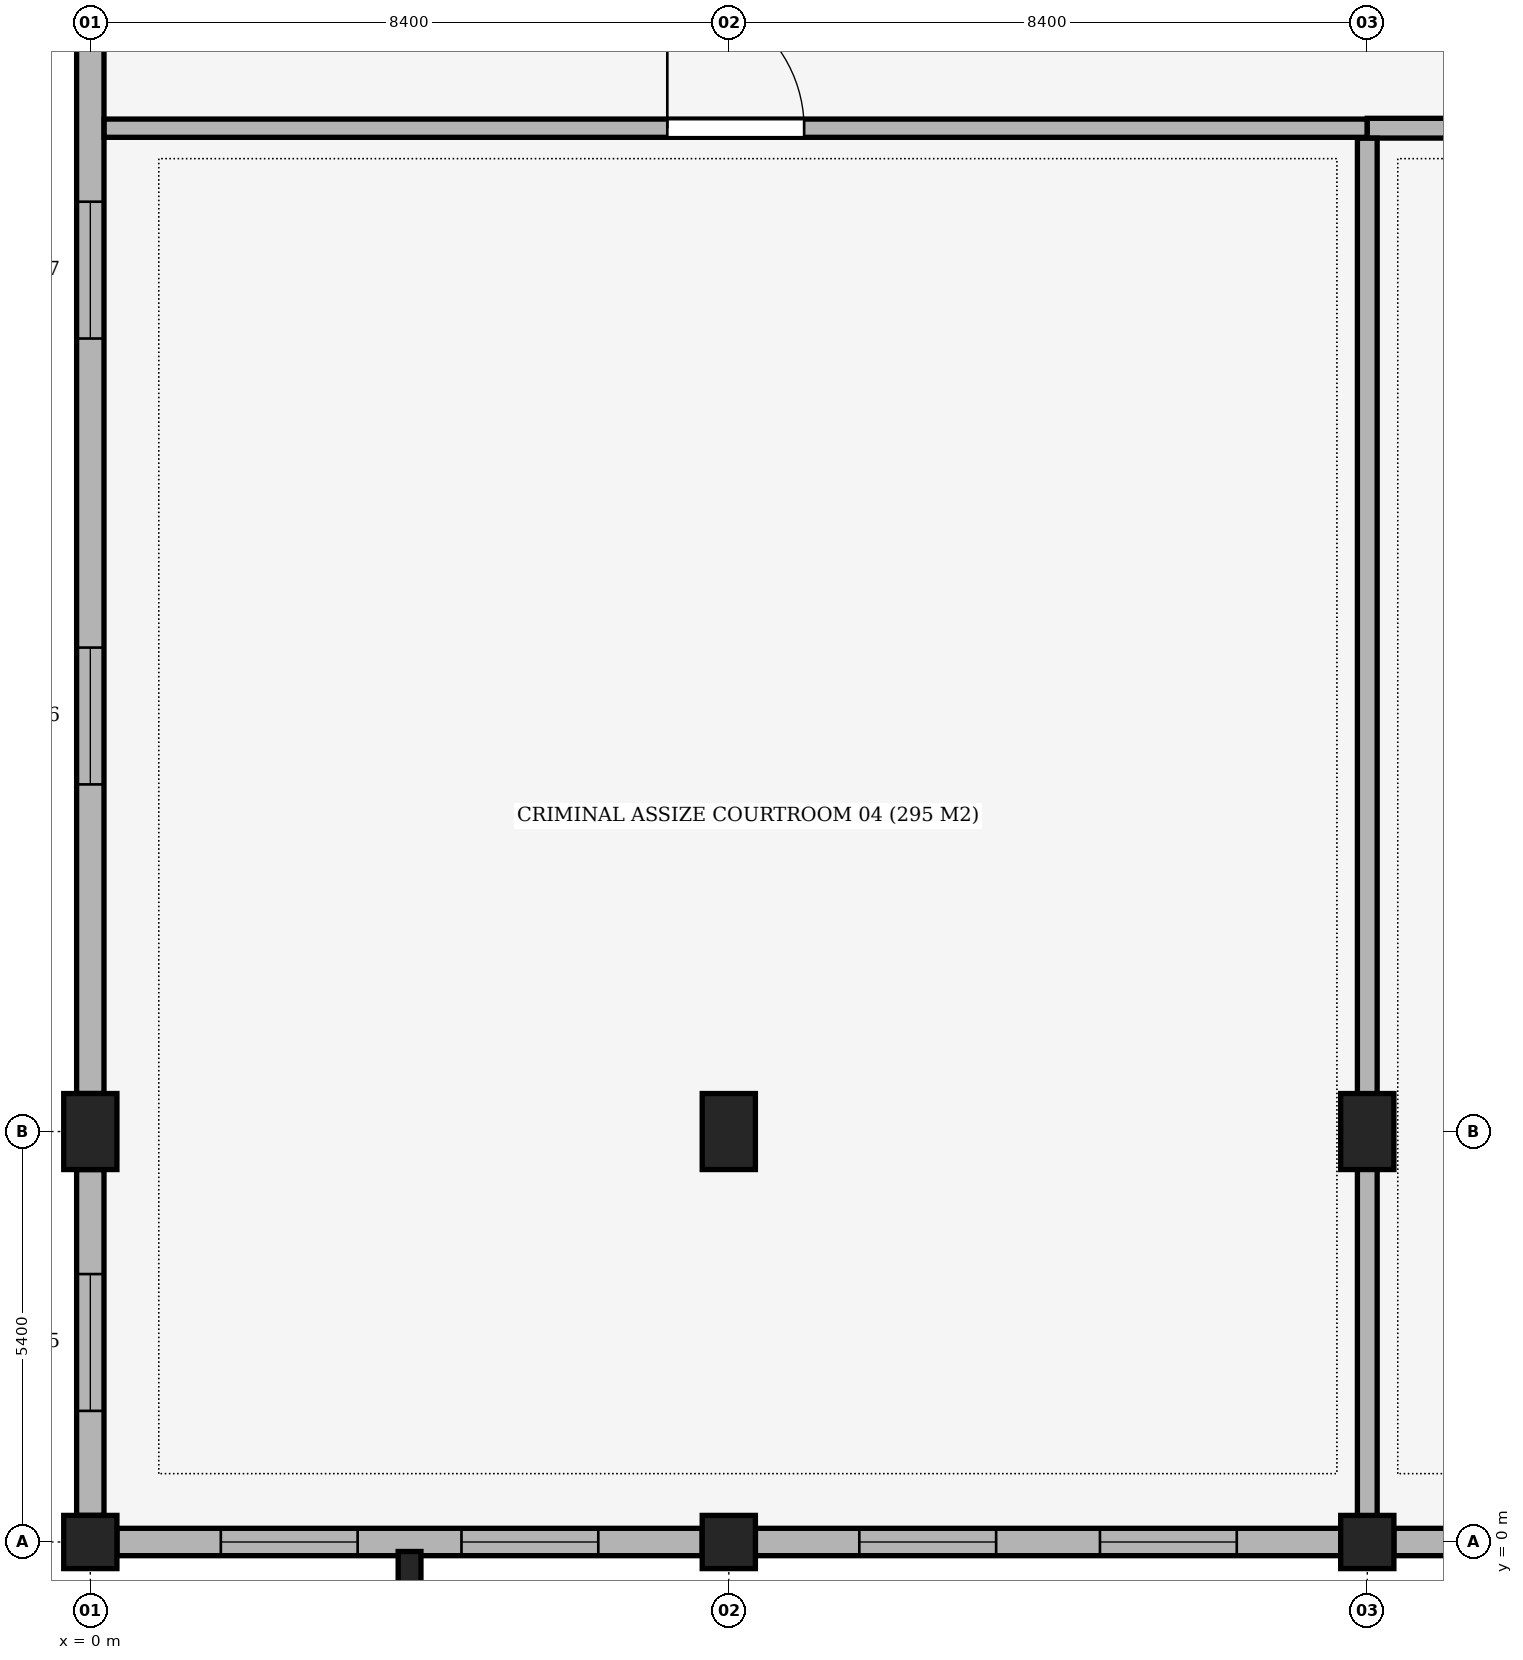
"""IFC4 building model, lengths in metres.
Left out: names, types, materials, properties, quantities, classifications, styles, units other than length and angle.
Written with IfcOpenShell. Run it as: python <this file> out.ifc"""

import sys

from ifc_helpers import new_model, si_unit, direction, frame, frame_2d, origin, origin_with_axes, origin_2d, place, context, subcontext, project, spatial, rectangle, extrude, element, fill, save


model = new_model("IFC4")
c1 = context("Model", 3, precision=1e-05, world=origin(), true_north=direction((0.0, 1.0)))
c2 = subcontext(c1, "Body", "Model", "MODEL_VIEW")
j1 = project(units=[si_unit("LENGTHUNIT", "METRE"), si_unit("PLANEANGLEUNIT", "RADIAN")], contexts=[c1])
p1 = place(None, origin())
s1 = spatial("IfcSite", under=j1, at=p1, CompositionType="ELEMENT")
p2 = place(p1, origin())
s2 = spatial("IfcBuilding", under=s1, at=p2, CompositionType="ELEMENT")
p3 = place(p2, frame((0.0, 0.0, 5.1)))
s3 = spatial("IfcBuildingStorey", under=s2, at=p3, CompositionType="ELEMENT", Elevation=5.1)
p4 = place(p3, origin_with_axes())
e1 = element("IfcColumn", 1, at=p4, inside=s3, PredefinedType="COLUMN", context=c2, shape_type="SweptSolid", body=[
    extrude(rectangle(XDim=0.7, YDim=0.7, at=origin_2d()), origin(), (0.0, 0.0, 1.0), 5.1),
])
p5 = place(p3, frame((0.0, 5.4, 0.0), z_axis=(0.0, 0.0, 1.0), x_axis=(1.0, 0.0, 0.0)))
e2 = element("IfcColumn", 2, at=p5, inside=s3, PredefinedType="COLUMN", context=c2, shape_type="SweptSolid", body=[
    extrude(rectangle(XDim=0.7, YDim=1.0, at=origin_2d()), origin(), (0.0, 0.0, 1.0), 5.1),
])
p6 = place(p3, frame((8.4, 0.0, 0.0), z_axis=(0.0, 0.0, 1.0), x_axis=(1.0, 0.0, 0.0)))
e3 = element("IfcColumn", 3, at=p6, inside=s3, PredefinedType="COLUMN", context=c2, shape_type="SweptSolid", body=[
    extrude(rectangle(XDim=0.7, YDim=0.7, at=origin_2d()), origin(), (0.0, 0.0, 1.0), 5.1),
])
p7 = place(p3, frame((8.4, 5.4, 0.0), z_axis=(0.0, 0.0, 1.0), x_axis=(1.0, 0.0, 0.0)))
e4 = element("IfcColumn", 4, at=p7, inside=s3, PredefinedType="COLUMN", context=c2, shape_type="SweptSolid", body=[
    extrude(rectangle(XDim=0.7, YDim=1.0, at=origin_2d()), origin(), (0.0, 0.0, 1.0), 5.1),
])
p8 = place(p3, frame((16.8, 0.0, 0.0), z_axis=(0.0, 0.0, 1.0), x_axis=(1.0, 0.0, 0.0)))
e5 = element("IfcColumn", 5, at=p8, inside=s3, PredefinedType="COLUMN", context=c2, shape_type="SweptSolid", body=[
    extrude(rectangle(XDim=0.7, YDim=0.7, at=origin_2d()), origin(), (0.0, 0.0, 1.0), 5.1),
])
p9 = place(p3, frame((16.8, 5.4, 0.0), z_axis=(0.0, 0.0, 1.0), x_axis=(1.0, 0.0, 0.0)))
e6 = element("IfcColumn", 6, at=p9, inside=s3, PredefinedType="COLUMN", context=c2, shape_type="SweptSolid", body=[
    extrude(rectangle(XDim=0.7, YDim=1.0, at=origin_2d()), origin(), (0.0, 0.0, 1.0), 5.1),
])
p10 = place(p3, frame((4.2, -0.35, 0.0), z_axis=(0.0, 0.0, 1.0), x_axis=(1.0, 0.0, 0.0)))
e7 = element("IfcColumn", 7, at=p10, inside=s3, PredefinedType="PILASTER", context=c2, shape_type="SweptSolid", body=[
    extrude(rectangle(XDim=0.3, YDim=0.45, at=origin_2d()), origin(), (0.0, 0.0, 1.0), 5.1),
])
p11 = place(p3, frame((24.85, 0.0, 0.0), z_axis=(0.0, 0.0, 1.0), x_axis=(-1.0, 0.0, 0.0)))
e8 = element("IfcWall", 8, at=p11, inside=s3, PredefinedType="SOLIDWALL", context=c2, shape_type="SweptSolid", body=[
    extrude(rectangle(XDim=7.7, YDim=0.36, at=frame_2d((3.85, 0.0))), origin(), (0.0, 0.0, 1.0), 4.07),
])
p12 = place(p11, frame((1.367, 0.0, 0.85)))
e9 = element("IfcOpeningElement", 9, at=p12, cuts=e8, PredefinedType="OPENING", context=c2, shape_type="SweptSolid", body=[
    extrude(rectangle(XDim=1.8, YDim=2.4, at=frame_2d((0.9, 1.2))), frame((0.0, 0.195, 0.0), z_axis=(0.0, -1.0, 0.0), x_axis=(1.0, 0.0, 0.0)), (0.0, 0.0, 1.0), 0.39),
])
p13 = place(p11, frame((4.533, 0.0, 0.85)))
e10 = element("IfcOpeningElement", 10, at=p13, cuts=e8, PredefinedType="OPENING", context=c2, shape_type="SweptSolid", body=[
    extrude(rectangle(XDim=1.8, YDim=2.4, at=frame_2d((0.9, 1.2))), frame((0.0, 0.195, 0.0), z_axis=(0.0, -1.0, 0.0), x_axis=(1.0, 0.0, 0.0)), (0.0, 0.0, 1.0), 0.39),
])
p14 = place(p3, frame((16.45, 0.0, 0.0), z_axis=(0.0, 0.0, 1.0), x_axis=(-1.0, 0.0, 0.0)))
e11 = element("IfcWall", 11, at=p14, inside=s3, PredefinedType="SOLIDWALL", context=c2, shape_type="SweptSolid", body=[
    extrude(rectangle(XDim=7.7, YDim=0.36, at=frame_2d((3.85, 0.0))), origin(), (0.0, 0.0, 1.0), 4.07),
])
p15 = place(p14, frame((1.367, 0.0, 0.85)))
e12 = element("IfcOpeningElement", 12, at=p15, cuts=e11, PredefinedType="OPENING", context=c2, shape_type="SweptSolid", body=[
    extrude(rectangle(XDim=1.8, YDim=2.4, at=frame_2d((0.9, 1.2))), frame((0.0, 0.195, 0.0), z_axis=(0.0, -1.0, 0.0), x_axis=(1.0, 0.0, 0.0)), (0.0, 0.0, 1.0), 0.39),
])
p16 = place(p14, frame((4.533, 0.0, 0.85)))
e13 = element("IfcOpeningElement", 13, at=p16, cuts=e11, PredefinedType="OPENING", context=c2, shape_type="SweptSolid", body=[
    extrude(rectangle(XDim=1.8, YDim=2.4, at=frame_2d((0.9, 1.2))), frame((0.0, 0.195, 0.0), z_axis=(0.0, -1.0, 0.0), x_axis=(1.0, 0.0, 0.0)), (0.0, 0.0, 1.0), 0.39),
])
p17 = place(p3, frame((8.05, 0.0, 0.0), z_axis=(0.0, 0.0, 1.0), x_axis=(-1.0, 0.0, 0.0)))
e14 = element("IfcWall", 14, at=p17, inside=s3, PredefinedType="SOLIDWALL", context=c2, shape_type="SweptSolid", body=[
    extrude(rectangle(XDim=7.7, YDim=0.36, at=frame_2d((3.85, 0.0))), origin(), (0.0, 0.0, 1.0), 4.07),
])
p18 = place(p17, frame((1.367, 0.0, 0.85)))
e15 = element("IfcOpeningElement", 15, at=p18, cuts=e14, PredefinedType="OPENING", context=c2, shape_type="SweptSolid", body=[
    extrude(rectangle(XDim=1.8, YDim=2.4, at=frame_2d((0.9, 1.2))), frame((0.0, 0.195, 0.0), z_axis=(0.0, -1.0, 0.0), x_axis=(1.0, 0.0, 0.0)), (0.0, 0.0, 1.0), 0.39),
])
p19 = place(p17, frame((4.533, 0.0, 0.85)))
e16 = element("IfcOpeningElement", 16, at=p19, cuts=e14, PredefinedType="OPENING", context=c2, shape_type="SweptSolid", body=[
    extrude(rectangle(XDim=1.8, YDim=2.4, at=frame_2d((0.9, 1.2))), frame((0.0, 0.195, 0.0), z_axis=(0.0, -1.0, 0.0), x_axis=(1.0, 0.0, 0.0)), (0.0, 0.0, 1.0), 0.39),
])
p20 = place(p3, frame((0.0, 0.35, 0.0), z_axis=(0.0, 0.0, 1.0), x_axis=(0.0, 1.0, 0.0)))
e17 = element("IfcWall", 17, at=p20, inside=s3, PredefinedType="SOLIDWALL", context=c2, shape_type="SweptSolid", body=[
    extrude(rectangle(XDim=4.55, YDim=0.36, at=frame_2d((2.275, 0.0))), origin(), (0.0, 0.0, 1.0), 4.27),
])
p21 = place(p20, frame((1.375, 0.0, 0.85)))
e18 = element("IfcOpeningElement", 18, at=p21, cuts=e17, PredefinedType="OPENING", context=c2, shape_type="SweptSolid", body=[
    extrude(rectangle(XDim=1.8, YDim=2.4, at=frame_2d((0.9, 1.2))), frame((0.0, 0.195, 0.0), z_axis=(0.0, -1.0, 0.0), x_axis=(1.0, 0.0, 0.0)), (0.0, 0.0, 1.0), 0.39),
])
p22 = place(p3, frame((0.0, 5.9, 0.0), z_axis=(0.0, 0.0, 1.0), x_axis=(0.0, 1.0, 0.0)))
e19 = element("IfcWall", 19, at=p22, inside=s3, PredefinedType="SOLIDWALL", context=c2, shape_type="SweptSolid", body=[
    extrude(rectangle(XDim=15.8, YDim=0.36, at=frame_2d((7.9, 0.0))), origin(), (0.0, 0.0, 1.0), 3.67),
])
p23 = place(p22, frame((4.067, 0.0, 0.85)))
e20 = element("IfcOpeningElement", 20, at=p23, cuts=e19, PredefinedType="OPENING", context=c2, shape_type="SweptSolid", body=[
    extrude(rectangle(XDim=1.8, YDim=2.4, at=frame_2d((0.9, 1.2))), frame((0.0, 0.195, 0.0), z_axis=(0.0, -1.0, 0.0), x_axis=(1.0, 0.0, 0.0)), (0.0, 0.0, 1.0), 0.39),
])
p24 = place(p22, frame((9.933, 0.0, 0.85)))
e21 = element("IfcOpeningElement", 21, at=p24, cuts=e19, PredefinedType="OPENING", context=c2, shape_type="SweptSolid", body=[
    extrude(rectangle(XDim=1.8, YDim=2.4, at=frame_2d((0.9, 1.2))), frame((0.0, 0.195, 0.0), z_axis=(0.0, -1.0, 0.0), x_axis=(1.0, 0.0, 0.0)), (0.0, 0.0, 1.0), 0.39),
])
p25 = place(p3, frame((0.182, 18.6, 0.0), z_axis=(0.0, 0.0, 1.0), x_axis=(1.0, 0.0, 0.0)))
e22 = element("IfcWall", 22, at=p25, inside=s3, PredefinedType="PARTITIONING", context=c2, shape_type="SweptSolid", body=[
    extrude(rectangle(XDim=16.618, YDim=0.24, at=frame_2d((8.309, 0.0))), origin(), (0.0, 0.0, 1.0), 3.67),
])
p26 = place(p25, frame((7.409, 0.0, 0.0)))
e23 = element("IfcOpeningElement", 23, at=p26, cuts=e22, PredefinedType="OPENING", context=c2, shape_type="SweptSolid", body=[
    extrude(rectangle(XDim=1.8, YDim=2.4, at=frame_2d((0.9, 1.2))), frame((0.0, 0.135, 0.0), z_axis=(0.0, -1.0, 0.0), x_axis=(1.0, 0.0, 0.0)), (0.0, 0.0, 1.0), 0.27),
])
p27 = place(p3, frame((16.8, 18.6, 0.0), z_axis=(0.0, 0.0, 1.0), x_axis=(1.0, 0.0, 0.0)))
e24 = element("IfcWall", 24, at=p27, inside=s3, PredefinedType="PARTITIONING", context=c2, shape_type="SweptSolid", body=[
    extrude(rectangle(XDim=16.3, YDim=0.26, at=frame_2d((8.15, 0.0))), origin(), (0.0, 0.0, 1.0), 3.67),
])
p28 = place(p27, frame((7.25, 0.0, 0.0)))
e25 = element("IfcOpeningElement", 25, at=p28, cuts=e24, PredefinedType="OPENING", context=c2, shape_type="SweptSolid", body=[
    extrude(rectangle(XDim=1.8, YDim=2.4, at=frame_2d((0.9, 1.2))), frame((0.0, 0.145, 0.0), z_axis=(0.0, -1.0, 0.0), x_axis=(1.0, 0.0, 0.0)), (0.0, 0.0, 1.0), 0.29),
])
p29 = place(p3, frame((16.8, 0.065, 0.0), z_axis=(0.0, 0.0, 1.0), x_axis=(0.0, 1.0, 0.0)))
e26 = element("IfcWall", 26, at=p29, inside=s3, PredefinedType="PARTITIONING", context=c2, shape_type="SweptSolid", body=[
    extrude(rectangle(XDim=18.403, YDim=0.26, at=frame_2d((9.202, 0.0))), origin(), (0.0, 0.0, 1.0), 3.67),
])
p30 = place(p15, origin())
e27 = element("IfcWindow", 27, at=p30, inside=s3, PartitioningType="SINGLE_PANEL", PredefinedType="WINDOW", context=c2, shape_type="SweptSolid", body=[
    extrude(rectangle(XDim=1.8, YDim=2.4, at=frame_2d((0.9, 1.2))), frame((0.0, 0.03, 0.0), z_axis=(0.0, -1.0, 0.0), x_axis=(1.0, 0.0, 0.0)), (0.0, 0.0, 1.0), 0.06),
])
fill(e12, e27)
p31 = place(p16, origin())
e28 = element("IfcWindow", 28, at=p31, inside=s3, PartitioningType="SINGLE_PANEL", PredefinedType="WINDOW", context=c2, shape_type="SweptSolid", body=[
    extrude(rectangle(XDim=1.8, YDim=2.4, at=frame_2d((0.9, 1.2))), frame((0.0, 0.03, 0.0), z_axis=(0.0, -1.0, 0.0), x_axis=(1.0, 0.0, 0.0)), (0.0, 0.0, 1.0), 0.06),
])
fill(e13, e28)
p32 = place(p18, origin())
e29 = element("IfcWindow", 29, at=p32, inside=s3, PartitioningType="SINGLE_PANEL", PredefinedType="WINDOW", context=c2, shape_type="SweptSolid", body=[
    extrude(rectangle(XDim=1.8, YDim=2.4, at=frame_2d((0.9, 1.2))), frame((0.0, 0.03, 0.0), z_axis=(0.0, -1.0, 0.0), x_axis=(1.0, 0.0, 0.0)), (0.0, 0.0, 1.0), 0.06),
])
fill(e15, e29)
p33 = place(p19, origin())
e30 = element("IfcWindow", 30, at=p33, inside=s3, PartitioningType="SINGLE_PANEL", PredefinedType="WINDOW", context=c2, shape_type="SweptSolid", body=[
    extrude(rectangle(XDim=1.8, YDim=2.4, at=frame_2d((0.9, 1.2))), frame((0.0, 0.03, 0.0), z_axis=(0.0, -1.0, 0.0), x_axis=(1.0, 0.0, 0.0)), (0.0, 0.0, 1.0), 0.06),
])
fill(e16, e30)
p34 = place(p21, origin())
e31 = element("IfcWindow", 31, at=p34, inside=s3, PartitioningType="SINGLE_PANEL", PredefinedType="WINDOW", context=c2, shape_type="SweptSolid", body=[
    extrude(rectangle(XDim=1.8, YDim=2.4, at=frame_2d((0.9, 1.2))), frame((0.0, 0.03, 0.0), z_axis=(0.0, -1.0, 0.0), x_axis=(1.0, 0.0, 0.0)), (0.0, 0.0, 1.0), 0.06),
])
fill(e18, e31)
p35 = place(p23, origin())
e32 = element("IfcWindow", 32, at=p35, inside=s3, PartitioningType="SINGLE_PANEL", PredefinedType="WINDOW", context=c2, shape_type="SweptSolid", body=[
    extrude(rectangle(XDim=1.8, YDim=2.4, at=frame_2d((0.9, 1.2))), frame((0.0, 0.03, 0.0), z_axis=(0.0, -1.0, 0.0), x_axis=(1.0, 0.0, 0.0)), (0.0, 0.0, 1.0), 0.06),
])
fill(e20, e32)
p36 = place(p24, origin())
e33 = element("IfcWindow", 33, at=p36, inside=s3, PartitioningType="SINGLE_PANEL", PredefinedType="WINDOW", context=c2, shape_type="SweptSolid", body=[
    extrude(rectangle(XDim=1.8, YDim=2.4, at=frame_2d((0.9, 1.2))), frame((0.0, 0.03, 0.0), z_axis=(0.0, -1.0, 0.0), x_axis=(1.0, 0.0, 0.0)), (0.0, 0.0, 1.0), 0.06),
])
fill(e21, e33)
p37 = place(p26, origin())
e34 = element("IfcDoor", 34, at=p37, inside=s3, OperationType="SINGLE_SWING_LEFT", PredefinedType="DOOR", context=c2, shape_type="SweptSolid", body=[
    extrude(rectangle(XDim=1.8, YDim=2.4, at=frame_2d((0.9, 1.2))), frame((0.0, 0.025, 0.0), z_axis=(0.0, -1.0, 0.0), x_axis=(1.0, 0.0, 0.0)), (0.0, 0.0, 1.0), 0.05),
])
fill(e23, e34)
save(model, sys.argv[1])
